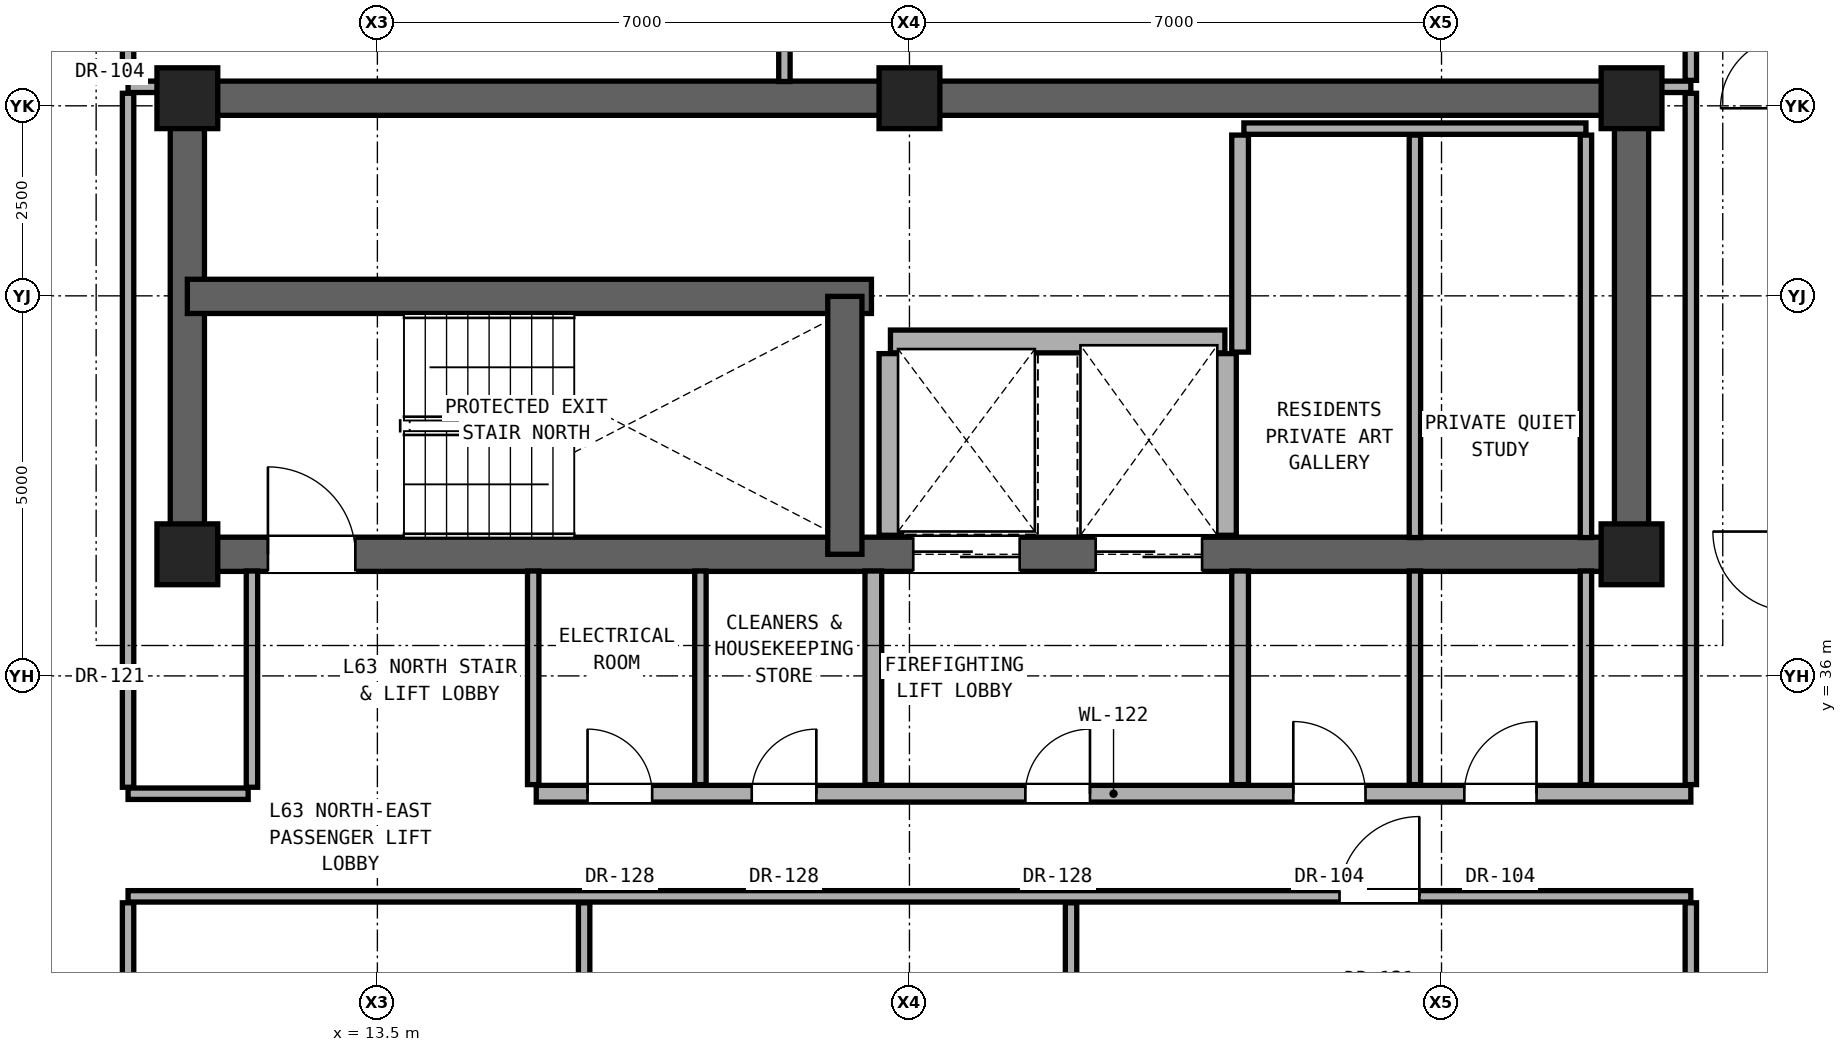
"""IFC4 building model, lengths in metres.
Left out: names, types, materials, properties, quantities, classifications, styles, units other than length and angle.
Written with IfcOpenShell. Run it as: python <this file> out.ifc"""

import sys

from ifc_helpers import new_model, si_unit, direction, frame, frame_2d, origin, origin_2d, place, context, subcontext, project, spatial, rectangle, extrude, element, fill, save


model = new_model("IFC4")
c1 = context("Model", 3, precision=1e-05, world=origin(), true_north=direction((0.0, 1.0)))
c2 = subcontext(c1, "Body", "Model", "MODEL_VIEW")
j1 = project(units=[si_unit("LENGTHUNIT", "METRE"), si_unit("PLANEANGLEUNIT", "RADIAN")], contexts=[c1])
p1 = place(None, origin())
s1 = spatial("IfcSite", under=j1, at=p1, CompositionType="ELEMENT")
p2 = place(p1, origin())
s2 = spatial("IfcBuilding", under=s1, at=p2, CompositionType="ELEMENT")
p3 = place(p2, frame((0.0, 0.0, 222.7)))
s3 = spatial("IfcBuildingStorey", under=s2, at=p3, CompositionType="ELEMENT", Elevation=222.7)
for number, where, z_axis, x_axis in (
    (1, (11.0, 37.6, 0.0), (0.0, 0.0, 1.0), (1.0, 0.0, 0.0)),
    (2, (30.0, 37.6, 0.0), (0.0, 0.0, 1.0), (1.0, 0.0, 0.0)),
    (3, (11.0, 43.6, 0.0), (0.0, 0.0, 1.0), (1.0, 0.0, 0.0)),
    (4, (20.5, 43.6, 0.0), (0.0, 0.0, 1.0), (1.0, 0.0, 0.0)),
    (5, (30.0, 43.6, 0.0), (0.0, 0.0, 1.0), (1.0, 0.0, 0.0)),
):
    element("IfcColumn", number, at=place(p3, frame(where, z_axis=z_axis, x_axis=x_axis)), inside=s3, PredefinedType="COLUMN", context=c2, shape_type="SweptSolid", body=[
        extrude(rectangle(XDim=0.8, YDim=0.8, at=origin_2d()), origin(), (0.0, 0.0, 1.0), 3.3),
    ])
p4 = place(p3, frame((11.0, 43.6, 0.0), z_axis=(0.0, 0.0, 1.0), x_axis=(1.0, 0.0, 0.0)))
e6 = element("IfcWall", 6, at=p4, inside=s3, PredefinedType="SHEAR", context=c2, shape_type="SweptSolid", body=[
    extrude(rectangle(XDim=19.0, YDim=0.45, at=frame_2d((9.5, 0.0))), origin(), (0.0, 0.0, 1.0), 3.1),
])
for number, where, z_axis, x_axis in (
    (7, (11.0, 37.6, 0.0), (0.0, 0.0, 1.0), (0.0, 1.0, 0.0)),
    (8, (30.0, 37.6, 0.0), (0.0, 0.0, 1.0), (0.0, 1.0, 0.0)),
):
    element("IfcWall", number, at=place(p3, frame(where, z_axis=z_axis, x_axis=x_axis)), inside=s3, PredefinedType="SHEAR", context=c2, shape_type="SweptSolid", body=[
        extrude(rectangle(XDim=6.0, YDim=0.45, at=frame_2d((3.0, 0.0))), origin(), (0.0, 0.0, 1.0), 3.1),
    ])
p5 = place(p3, frame((11.0, 37.6, 0.0), z_axis=(0.0, 0.0, 1.0), x_axis=(1.0, 0.0, 0.0)))
e9 = element("IfcWall", 9, at=p5, inside=s3, PredefinedType="SHEAR", context=c2, shape_type="SweptSolid", body=[
    extrude(rectangle(XDim=19.0, YDim=0.45, at=frame_2d((9.5, 0.0))), origin(), (0.0, 0.0, 1.0), 3.1),
])
p6 = place(p5, frame((1.06, 0.0, 0.0)))
e10 = element("IfcOpeningElement", 10, at=p6, cuts=e9, PredefinedType="OPENING", context=c2, shape_type="SweptSolid", body=[
    extrude(rectangle(XDim=1.15, YDim=2.2, at=frame_2d((0.575, 1.1))), frame((0.0, 0.235, 0.0), z_axis=(0.0, -1.0, 0.0), x_axis=(1.0, 0.0, 0.0)), (0.0, 0.0, 1.0), 0.47),
])
p7 = place(p5, frame((9.55, 0.0, 0.0)))
e11 = element("IfcOpeningElement", 11, at=p7, cuts=e9, PredefinedType="OPENING", context=c2, shape_type="SweptSolid", body=[
    extrude(rectangle(XDim=1.4, YDim=2.35, at=frame_2d((0.7, 1.175))), frame((0.0, 0.235, 0.0), z_axis=(0.0, -1.0, 0.0), x_axis=(1.0, 0.0, 0.0)), (0.0, 0.0, 1.0), 0.47),
])
p8 = place(p5, frame((11.95, 0.0, 0.0)))
e12 = element("IfcOpeningElement", 12, at=p8, cuts=e9, PredefinedType="OPENING", context=c2, shape_type="SweptSolid", body=[
    extrude(rectangle(XDim=1.4, YDim=2.35, at=frame_2d((0.7, 1.175))), frame((0.0, 0.235, 0.0), z_axis=(0.0, -1.0, 0.0), x_axis=(1.0, 0.0, 0.0)), (0.0, 0.0, 1.0), 0.47),
])
p9 = place(p3, frame((11.0, 40.993, 0.0), z_axis=(0.0, 0.0, 1.0), x_axis=(1.0, 0.0, 0.0)))
e13 = element("IfcWall", 13, at=p9, inside=s3, PredefinedType="SHEAR", context=c2, shape_type="SweptSolid", body=[
    extrude(rectangle(XDim=9.0, YDim=0.45, at=frame_2d((4.5, 0.0))), origin(), (0.0, 0.0, 1.0), 3.1),
])
p10 = place(p3, frame((19.65, 37.6, 0.0), z_axis=(0.0, 0.0, 1.0), x_axis=(0.0, 1.0, 0.0)))
e14 = element("IfcWall", 14, at=p10, inside=s3, PredefinedType="SHEAR", context=c2, shape_type="SweptSolid", body=[
    extrude(rectangle(XDim=3.393, YDim=0.45, at=frame_2d((1.696, 0.0))), origin(), (0.0, 0.0, 1.0), 3.1),
])
p11 = place(p3, frame((10.22, 33.1, 0.0), z_axis=(0.0, 0.0, 1.0), x_axis=(1.0, 0.0, 0.0)))
e15 = element("IfcWall", 15, at=p11, inside=s3, PredefinedType="PARTITIONING", context=c2, shape_type="SweptSolid", body=[
    extrude(rectangle(XDim=20.56, YDim=0.15, at=frame_2d((10.28, 0.0))), origin(), (0.0, 0.0, 1.0), 2.236),
])
p12 = place(p11, frame((15.938, 0.0, 0.0)))
e16 = element("IfcOpeningElement", 16, at=p12, cuts=e15, PredefinedType="OPENING", context=c2, shape_type="SweptSolid", body=[
    extrude(rectangle(XDim=1.05, YDim=2.2, at=frame_2d((0.525, 1.1))), frame((0.0, 0.085, 0.0), z_axis=(0.0, -1.0, 0.0), x_axis=(1.0, 0.0, 0.0)), (0.0, 0.0, 1.0), 0.17),
])
p13 = place(p3, frame((10.22, 34.45, 0.0), z_axis=(0.0, 0.0, 1.0), x_axis=(1.0, 0.0, 0.0)))
e17 = element("IfcWall", 17, at=p13, inside=s3, PredefinedType="PARTITIONING", context=c2, shape_type="SweptSolid", body=[
    extrude(rectangle(XDim=1.58, YDim=0.15, at=frame_2d((0.79, 0.0))), origin(), (0.0, 0.0, 1.0), 2.236),
])
p14 = place(p3, frame((15.59, 34.45, 0.0), z_axis=(0.0, 0.0, 1.0), x_axis=(1.0, 0.0, 0.0)))
e18 = element("IfcWall", 18, at=p14, inside=s3, PredefinedType="SOLIDWALL", context=c2, shape_type="SweptSolid", body=[
    extrude(rectangle(XDim=15.19, YDim=0.22, at=frame_2d((7.595, 0.0))), origin(), (0.0, 0.0, 1.0), 2.236),
])
p15 = place(p14, frame((6.435, 0.0, 0.0)))
e19 = element("IfcOpeningElement", 19, at=p15, cuts=e18, PredefinedType="OPENING", context=c2, shape_type="SweptSolid", body=[
    extrude(rectangle(XDim=0.85, YDim=2.01, at=frame_2d((0.425, 1.005))), frame((0.0, 0.12, 0.0), z_axis=(0.0, -1.0, 0.0), x_axis=(1.0, 0.0, 0.0)), (0.0, 0.0, 1.0), 0.24),
])
p16 = place(p14, frame((9.96, 0.0, 0.0)))
e20 = element("IfcOpeningElement", 20, at=p16, cuts=e18, PredefinedType="OPENING", context=c2, shape_type="SweptSolid", body=[
    extrude(rectangle(XDim=0.95, YDim=2.15, at=frame_2d((0.475, 1.075))), frame((0.0, 0.12, 0.0), z_axis=(0.0, -1.0, 0.0), x_axis=(1.0, 0.0, 0.0)), (0.0, 0.0, 1.0), 0.24),
])
p17 = place(p14, frame((12.21, 0.0, 0.0)))
e21 = element("IfcOpeningElement", 21, at=p17, cuts=e18, PredefinedType="OPENING", context=c2, shape_type="SweptSolid", body=[
    extrude(rectangle(XDim=0.95, YDim=2.15, at=frame_2d((0.475, 1.075))), frame((0.0, 0.12, 0.0), z_axis=(0.0, -1.0, 0.0), x_axis=(1.0, 0.0, 0.0)), (0.0, 0.0, 1.0), 0.24),
])
p18 = place(p14, frame((0.675, 0.0, 0.0)))
e22 = element("IfcOpeningElement", 22, at=p18, cuts=e18, PredefinedType="OPENING", context=c2, shape_type="SweptSolid", body=[
    extrude(rectangle(XDim=0.85, YDim=2.01, at=frame_2d((0.425, 1.005))), frame((0.0, 0.12, 0.0), z_axis=(0.0, -1.0, 0.0), x_axis=(1.0, 0.0, 0.0)), (0.0, 0.0, 1.0), 0.24),
])
p19 = place(p14, frame((2.835, 0.0, 0.0)))
e23 = element("IfcOpeningElement", 23, at=p19, cuts=e18, PredefinedType="OPENING", context=c2, shape_type="SweptSolid", body=[
    extrude(rectangle(XDim=0.85, YDim=2.01, at=frame_2d((0.425, 1.005))), frame((0.0, 0.12, 0.0), z_axis=(0.0, -1.0, 0.0), x_axis=(1.0, 0.0, 0.0)), (0.0, 0.0, 1.0), 0.24),
])
p20 = place(p3, frame((20.25, 40.4, 0.0), z_axis=(0.0, 0.0, 1.0), x_axis=(1.0, 0.0, 0.0)))
e24 = element("IfcWall", 24, at=p20, inside=s3, PredefinedType="SOLIDWALL", context=c2, shape_type="SweptSolid", body=[
    extrude(rectangle(XDim=4.4, YDim=0.3, at=frame_2d((2.2, 0.0))), origin(), (0.0, 0.0, 1.0), 3.1),
])
p21 = place(p3, frame((24.9, 43.2, 0.0), z_axis=(0.0, 0.0, 1.0), x_axis=(1.0, 0.0, 0.0)))
e25 = element("IfcWall", 25, at=p21, inside=s3, PredefinedType="PARTITIONING", context=c2, shape_type="SweptSolid", body=[
    extrude(rectangle(XDim=4.5, YDim=0.15, at=frame_2d((2.25, 0.0))), origin(), (0.0, 0.0, 1.0), 3.1),
])
for number, where, z_axis, x_axis in (
    (26, (10.22, 43.75, 0.0), (0.0, 0.0, 1.0), (1.0, 0.0, 0.0)),
    (27, (30.22, 43.75, 0.0), (0.0, 0.0, 1.0), (1.0, 0.0, 0.0)),
):
    element("IfcWall", number, at=place(p3, frame(where, z_axis=z_axis, x_axis=x_axis)), inside=s3, PredefinedType="PARTITIONING", context=c2, shape_type="SweptSolid", body=[
        extrude(rectangle(XDim=0.56, YDim=0.15, at=frame_2d((0.28, 0.0))), origin(), (0.0, 0.0, 1.0), 3.1),
    ])
p22 = place(p3, frame((10.22, 22.935, 0.0), z_axis=(0.0, 0.0, 1.0), x_axis=(0.0, 1.0, 0.0)))
e28 = element("IfcWall", 28, at=p22, inside=s3, PredefinedType="PARTITIONING", context=c2, shape_type="SweptSolid", body=[
    extrude(rectangle(XDim=10.08, YDim=0.15, at=frame_2d((5.04, 0.0))), origin(), (0.0, 0.0, 1.0), 2.396),
])
p23 = place(p22, frame((4.565, 0.0, 0.0)))
e29 = element("IfcOpeningElement", 29, at=p23, cuts=e28, PredefinedType="OPENING", context=c2, shape_type="SweptSolid", body=[
    extrude(rectangle(XDim=0.95, YDim=2.15, at=frame_2d((0.475, 1.075))), frame((0.0, 0.085, 0.0), z_axis=(0.0, -1.0, 0.0), x_axis=(1.0, 0.0, 0.0)), (0.0, 0.0, 1.0), 0.17),
])
p24 = place(p3, frame((10.22, 34.535, 0.0), z_axis=(0.0, 0.0, 1.0), x_axis=(0.0, 1.0, 0.0)))
e30 = element("IfcWall", 30, at=p24, inside=s3, PredefinedType="PARTITIONING", context=c2, shape_type="SweptSolid", body=[
    extrude(rectangle(XDim=9.13, YDim=0.15, at=frame_2d((4.565, 0.0))), origin(), (0.0, 0.0, 1.0), 2.492),
])
p25 = place(p3, frame((10.22, 43.835, 0.0), z_axis=(0.0, 0.0, 1.0), x_axis=(0.0, 1.0, 0.0)))
e31 = element("IfcWall", 31, at=p25, inside=s3, PredefinedType="PARTITIONING", context=c2, shape_type="SweptSolid", body=[
    extrude(rectangle(XDim=2.703, YDim=0.15, at=frame_2d((1.352, 0.0))), origin(), (0.0, 0.0, 1.0), 3.1),
])
p26 = place(p25, frame((0.826, 0.0, 0.0)))
e32 = element("IfcOpeningElement", 32, at=p26, cuts=e31, PredefinedType="OPENING", context=c2, shape_type="SweptSolid", body=[
    extrude(rectangle(XDim=1.05, YDim=2.2, at=frame_2d((0.525, 1.1))), frame((0.0, 0.085, 0.0), z_axis=(0.0, -1.0, 0.0), x_axis=(1.0, 0.0, 0.0)), (0.0, 0.0, 1.0), 0.17),
])
p27 = place(p3, frame((11.85, 34.535, 0.0), z_axis=(0.0, 0.0, 1.0), x_axis=(0.0, 1.0, 0.0)))
e33 = element("IfcWall", 33, at=p27, inside=s3, PredefinedType="PARTITIONING", context=c2, shape_type="SweptSolid", body=[
    extrude(rectangle(XDim=2.845, YDim=0.15, at=frame_2d((1.422, 0.0))), origin(), (0.0, 0.0, 1.0), 3.1),
])
p28 = place(p3, frame((15.55, 34.57, 0.0), z_axis=(0.0, 0.0, 1.0), x_axis=(0.0, 1.0, 0.0)))
e34 = element("IfcWall", 34, at=p28, inside=s3, PredefinedType="PARTITIONING", context=c2, shape_type="SweptSolid", body=[
    extrude(rectangle(XDim=2.81, YDim=0.15, at=frame_2d((1.405, 0.0))), origin(), (0.0, 0.0, 1.0), 3.1),
])
p29 = place(p3, frame((16.22, 22.935, 0.0), z_axis=(0.0, 0.0, 1.0), x_axis=(0.0, 1.0, 0.0)))
e35 = element("IfcWall", 35, at=p29, inside=s3, PredefinedType="PARTITIONING", context=c2, shape_type="SweptSolid", body=[
    extrude(rectangle(XDim=10.08, YDim=0.15, at=frame_2d((5.04, 0.0))), origin(), (0.0, 0.0, 1.0), 2.236),
])
p30 = place(p3, frame((17.75, 34.57, 0.0), z_axis=(0.0, 0.0, 1.0), x_axis=(0.0, 1.0, 0.0)))
e36 = element("IfcWall", 36, at=p30, inside=s3, PredefinedType="PARTITIONING", context=c2, shape_type="SweptSolid", body=[
    extrude(rectangle(XDim=2.81, YDim=0.15, at=frame_2d((1.405, 0.0))), origin(), (0.0, 0.0, 1.0), 3.1),
])
p31 = place(p3, frame((18.855, 43.82, 0.0), z_axis=(0.0, 0.0, 1.0), x_axis=(0.0, 1.0, 0.0)))
e37 = element("IfcWall", 37, at=p31, inside=s3, PredefinedType="PARTITIONING", context=c2, shape_type="SweptSolid", body=[
    extrude(rectangle(XDim=2.718, YDim=0.15, at=frame_2d((1.359, 0.0))), origin(), (0.0, 0.0, 1.0), 3.1),
])
p32 = place(p3, frame((20.025, 34.57, 0.0), z_axis=(0.0, 0.0, 1.0), x_axis=(0.0, 1.0, 0.0)))
e38 = element("IfcWall", 38, at=p32, inside=s3, PredefinedType="SOLIDWALL", context=c2, shape_type="SweptSolid", body=[
    extrude(rectangle(XDim=2.81, YDim=0.22, at=frame_2d((1.405, 0.0))), origin(), (0.0, 0.0, 1.0), 3.1),
])
p33 = place(p3, frame((20.25, 37.85, 0.0), z_axis=(0.0, 0.0, 1.0), x_axis=(0.0, 1.0, 0.0)))
e39 = element("IfcWall", 39, at=p33, inside=s3, PredefinedType="SOLIDWALL", context=c2, shape_type="SweptSolid", body=[
    extrude(rectangle(XDim=2.39, YDim=0.3, at=frame_2d((1.195, 0.0))), origin(), (0.0, 0.0, 1.0), 3.1),
])
p34 = place(p3, frame((22.626, 19.985, 0.0), z_axis=(0.0, 0.0, 1.0), x_axis=(0.0, 1.0, 0.0)))
e40 = element("IfcWall", 40, at=p34, inside=s3, PredefinedType="PARTITIONING", context=c2, shape_type="SweptSolid", body=[
    extrude(rectangle(XDim=13.03, YDim=0.15, at=frame_2d((6.515, 0.0))), origin(), (0.0, 0.0, 1.0), 2.236),
])
p35 = place(p3, frame((24.65, 37.85, 0.0), z_axis=(0.0, 0.0, 1.0), x_axis=(0.0, 1.0, 0.0)))
e41 = element("IfcWall", 41, at=p35, inside=s3, PredefinedType="SOLIDWALL", context=c2, shape_type="SweptSolid", body=[
    extrude(rectangle(XDim=2.39, YDim=0.3, at=frame_2d((1.195, 0.0))), origin(), (0.0, 0.0, 1.0), 3.1),
])
p36 = place(p3, frame((24.85, 34.57, 0.0), z_axis=(0.0, 0.0, 1.0), x_axis=(0.0, 1.0, 0.0)))
e42 = element("IfcWall", 42, at=p36, inside=s3, PredefinedType="SOLIDWALL", context=c2, shape_type="SweptSolid", body=[
    extrude(rectangle(XDim=2.81, YDim=0.22, at=frame_2d((1.405, 0.0))), origin(), (0.0, 0.0, 1.0), 3.1),
])
p37 = place(p3, frame((24.85, 40.26, 0.0), z_axis=(0.0, 0.0, 1.0), x_axis=(0.0, 1.0, 0.0)))
e43 = element("IfcWall", 43, at=p37, inside=s3, PredefinedType="SOLIDWALL", context=c2, shape_type="SweptSolid", body=[
    extrude(rectangle(XDim=2.855, YDim=0.22, at=frame_2d((1.427, 0.0))), origin(), (0.0, 0.0, 1.0), 3.1),
])
p38 = place(p3, frame((27.15, 34.57, 0.0), z_axis=(0.0, 0.0, 1.0), x_axis=(0.0, 1.0, 0.0)))
e44 = element("IfcWall", 44, at=p38, inside=s3, PredefinedType="PARTITIONING", context=c2, shape_type="SweptSolid", body=[
    extrude(rectangle(XDim=2.81, YDim=0.15, at=frame_2d((1.405, 0.0))), origin(), (0.0, 0.0, 1.0), 3.1),
])
p39 = place(p3, frame((27.15, 37.82, 0.0), z_axis=(0.0, 0.0, 1.0), x_axis=(0.0, 1.0, 0.0)))
e45 = element("IfcWall", 45, at=p39, inside=s3, PredefinedType="PARTITIONING", context=c2, shape_type="SweptSolid", body=[
    extrude(rectangle(XDim=5.295, YDim=0.15, at=frame_2d((2.647, 0.0))), origin(), (0.0, 0.0, 1.0), 3.1),
])
p40 = place(p3, frame((29.4, 34.57, 0.0), z_axis=(0.0, 0.0, 1.0), x_axis=(0.0, 1.0, 0.0)))
e46 = element("IfcWall", 46, at=p40, inside=s3, PredefinedType="PARTITIONING", context=c2, shape_type="SweptSolid", body=[
    extrude(rectangle(XDim=2.81, YDim=0.15, at=frame_2d((1.405, 0.0))), origin(), (0.0, 0.0, 1.0), 3.1),
])
p41 = place(p3, frame((29.4, 37.82, 0.0), z_axis=(0.0, 0.0, 1.0), x_axis=(0.0, 1.0, 0.0)))
e47 = element("IfcWall", 47, at=p41, inside=s3, PredefinedType="PARTITIONING", context=c2, shape_type="SweptSolid", body=[
    extrude(rectangle(XDim=5.295, YDim=0.15, at=frame_2d((2.647, 0.0))), origin(), (0.0, 0.0, 1.0), 3.1),
])
p42 = place(p3, frame((30.78, 19.985, 0.0), z_axis=(0.0, 0.0, 1.0), x_axis=(0.0, 1.0, 0.0)))
e48 = element("IfcWall", 48, at=p42, inside=s3, PredefinedType="PARTITIONING", context=c2, shape_type="SweptSolid", body=[
    extrude(rectangle(XDim=13.03, YDim=0.15, at=frame_2d((6.515, 0.0))), origin(), (0.0, 0.0, 1.0), 2.396),
])
p43 = place(p3, frame((30.78, 34.57, 0.0), z_axis=(0.0, 0.0, 1.0), x_axis=(0.0, 1.0, 0.0)))
e49 = element("IfcWall", 49, at=p43, inside=s3, PredefinedType="PARTITIONING", context=c2, shape_type="SweptSolid", body=[
    extrude(rectangle(XDim=9.095, YDim=0.15, at=frame_2d((4.547, 0.0))), origin(), (0.0, 0.0, 1.0), 2.492),
])
p44 = place(p3, frame((30.78, 43.835, 0.0), z_axis=(0.0, 0.0, 1.0), x_axis=(0.0, 1.0, 0.0)))
e50 = element("IfcWall", 50, at=p44, inside=s3, PredefinedType="PARTITIONING", context=c2, shape_type="SweptSolid", body=[
    extrude(rectangle(XDim=2.703, YDim=0.15, at=frame_2d((1.352, 0.0))), origin(), (0.0, 0.0, 1.0), 3.1),
])
p45 = place(p44, frame((0.826, 0.0, 0.0)))
e51 = element("IfcOpeningElement", 51, at=p45, cuts=e50, PredefinedType="OPENING", context=c2, shape_type="SweptSolid", body=[
    extrude(rectangle(XDim=1.05, YDim=2.2, at=frame_2d((0.525, 1.1))), frame((0.0, 0.085, 0.0), z_axis=(0.0, -1.0, 0.0), x_axis=(1.0, 0.0, 0.0)), (0.0, 0.0, 1.0), 0.17),
])
p46 = place(p6, origin())
e52 = element("IfcDoor", 52, at=p46, inside=s3, OperationType="SINGLE_SWING_LEFT", PredefinedType="DOOR", context=c2, shape_type="SweptSolid", body=[
    extrude(rectangle(XDim=1.15, YDim=2.2, at=frame_2d((0.575, 1.1))), frame((0.0, 0.025, 0.0), z_axis=(0.0, -1.0, 0.0), x_axis=(1.0, 0.0, 0.0)), (0.0, 0.0, 1.0), 0.05),
])
fill(e10, e52)
p47 = place(p15, origin())
e53 = element("IfcDoor", 53, at=p47, inside=s3, OperationType="SINGLE_SWING_RIGHT", PredefinedType="DOOR", context=c2, shape_type="SweptSolid", body=[
    extrude(rectangle(XDim=0.85, YDim=2.01, at=frame_2d((0.425, 1.005))), frame((0.0, 0.025, 0.0), z_axis=(0.0, -1.0, 0.0), x_axis=(1.0, 0.0, 0.0)), (0.0, 0.0, 1.0), 0.05),
])
fill(e19, e53)
p48 = place(p16, origin())
e54 = element("IfcDoor", 54, at=p48, inside=s3, OperationType="SINGLE_SWING_LEFT", PredefinedType="DOOR", context=c2, shape_type="SweptSolid", body=[
    extrude(rectangle(XDim=0.95, YDim=2.15, at=frame_2d((0.475, 1.075))), frame((0.0, 0.025, 0.0), z_axis=(0.0, -1.0, 0.0), x_axis=(1.0, 0.0, 0.0)), (0.0, 0.0, 1.0), 0.05),
])
fill(e20, e54)
p49 = place(p17, origin())
e55 = element("IfcDoor", 55, at=p49, inside=s3, OperationType="SINGLE_SWING_RIGHT", PredefinedType="DOOR", context=c2, shape_type="SweptSolid", body=[
    extrude(rectangle(XDim=0.95, YDim=2.15, at=frame_2d((0.475, 1.075))), frame((0.0, 0.025, 0.0), z_axis=(0.0, -1.0, 0.0), x_axis=(1.0, 0.0, 0.0)), (0.0, 0.0, 1.0), 0.05),
])
fill(e21, e55)
p50 = place(p18, origin())
e56 = element("IfcDoor", 56, at=p50, inside=s3, OperationType="SINGLE_SWING_LEFT", PredefinedType="DOOR", context=c2, shape_type="SweptSolid", body=[
    extrude(rectangle(XDim=0.85, YDim=2.01, at=frame_2d((0.425, 1.005))), frame((0.0, 0.025, 0.0), z_axis=(0.0, -1.0, 0.0), x_axis=(1.0, 0.0, 0.0)), (0.0, 0.0, 1.0), 0.05),
])
fill(e22, e56)
p51 = place(p19, origin())
e57 = element("IfcDoor", 57, at=p51, inside=s3, OperationType="SINGLE_SWING_RIGHT", PredefinedType="DOOR", context=c2, shape_type="SweptSolid", body=[
    extrude(rectangle(XDim=0.85, YDim=2.01, at=frame_2d((0.425, 1.005))), frame((0.0, 0.025, 0.0), z_axis=(0.0, -1.0, 0.0), x_axis=(1.0, 0.0, 0.0)), (0.0, 0.0, 1.0), 0.05),
])
fill(e23, e57)
p52 = place(p12, origin())
e58 = element("IfcDoor", 58, at=p52, inside=s3, OperationType="SINGLE_SWING_RIGHT", PredefinedType="DOOR", context=c2, shape_type="SweptSolid", body=[
    extrude(rectangle(XDim=1.05, YDim=2.2, at=frame_2d((0.525, 1.1))), frame((0.0, 0.025, 0.0), z_axis=(0.0, -1.0, 0.0), x_axis=(1.0, 0.0, 0.0)), (0.0, 0.0, 1.0), 0.05),
])
fill(e16, e58)
p53 = place(p7, origin())
e59 = element("IfcDoor", 59, at=p53, inside=s3, OperationType="DOUBLE_DOOR_SLIDING", PredefinedType="DOOR", context=c2, shape_type="SweptSolid", body=[
    extrude(rectangle(XDim=1.4, YDim=2.35, at=frame_2d((0.7, 1.175))), frame((0.0, 0.025, 0.0), z_axis=(0.0, -1.0, 0.0), x_axis=(1.0, 0.0, 0.0)), (0.0, 0.0, 1.0), 0.05),
])
fill(e11, e59)
p54 = place(p8, origin())
e60 = element("IfcDoor", 60, at=p54, inside=s3, OperationType="DOUBLE_DOOR_SLIDING", PredefinedType="DOOR", context=c2, shape_type="SweptSolid", body=[
    extrude(rectangle(XDim=1.4, YDim=2.35, at=frame_2d((0.7, 1.175))), frame((0.0, 0.025, 0.0), z_axis=(0.0, -1.0, 0.0), x_axis=(1.0, 0.0, 0.0)), (0.0, 0.0, 1.0), 0.05),
])
fill(e12, e60)
save(model, sys.argv[1])
